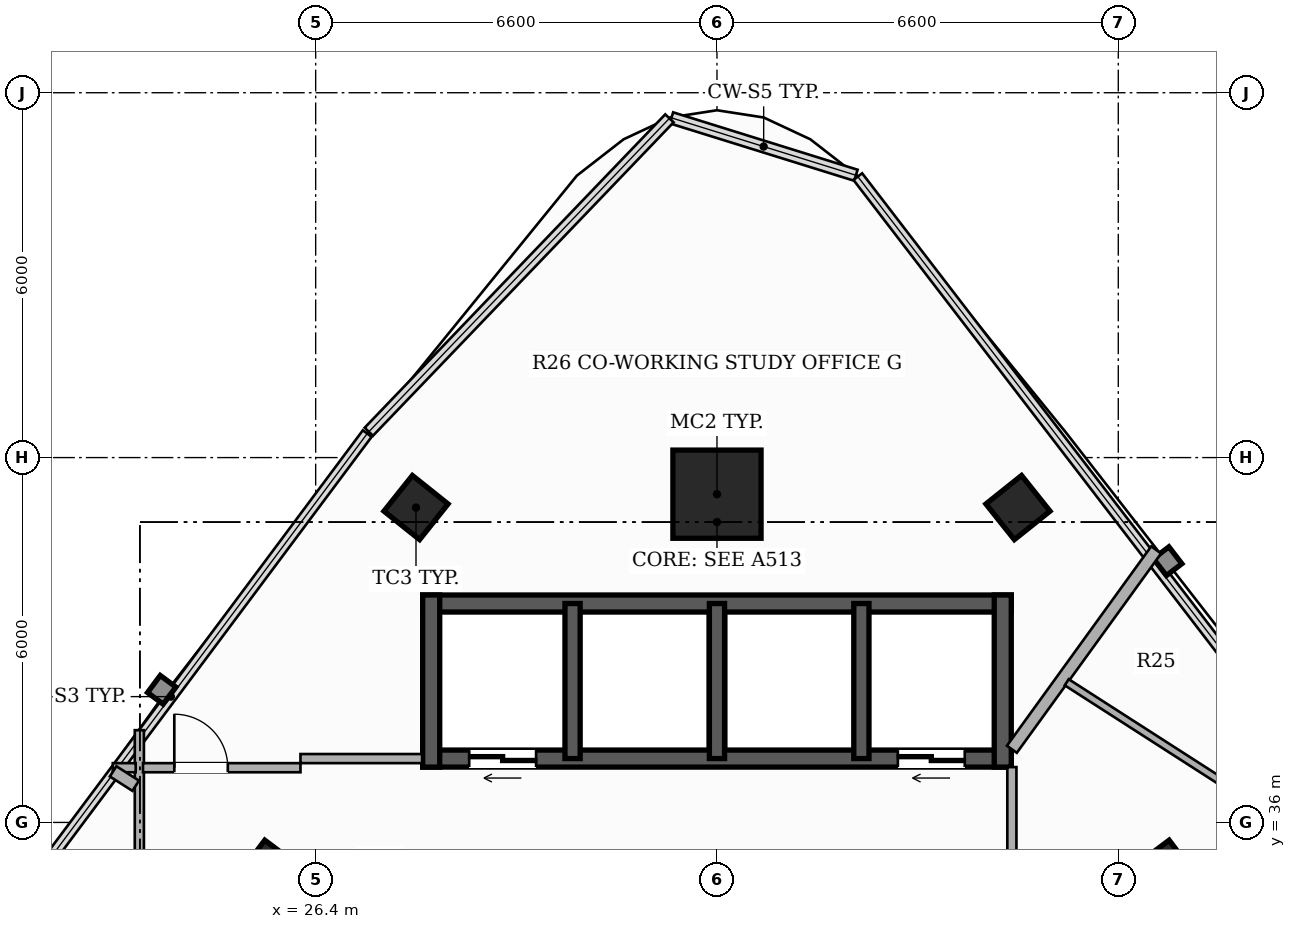
"""IFC4 building model, lengths in metres.
Left out: names, types, materials, properties, quantities, classifications, styles, units other than length and angle.
Written with IfcOpenShell. Run it as: python <this file> out.ifc"""

import sys

from ifc_helpers import new_model, si_unit, direction, frame, frame_2d, origin, origin_2d, place, context, subcontext, project, spatial, rectangle, hollow_rectangle, extrude, element, fill, save


model = new_model("IFC4")
c1 = context("Model", 3, precision=1e-05, world=origin(), true_north=direction((0.0, 1.0)))
c2 = subcontext(c1, "Body", "Model", "MODEL_VIEW")
j1 = project(units=[si_unit("LENGTHUNIT", "METRE"), si_unit("PLANEANGLEUNIT", "RADIAN")], contexts=[c1])
p1 = place(None, origin())
s1 = spatial("IfcSite", under=j1, at=p1, CompositionType="ELEMENT")
p2 = place(p1, origin())
s2 = spatial("IfcBuilding", under=s1, at=p2, CompositionType="ELEMENT")
p3 = place(p2, frame((0.0, 0.0, 177.05)))
s3 = spatial("IfcBuildingStorey", under=s2, at=p3, CompositionType="ELEMENT", Elevation=177.05)
p4 = place(p3, frame((37.84, 37.05, 0.0), z_axis=(0.0, 0.0, 1.0), x_axis=(-1.0, 0.0, 0.0)))
e1 = element("IfcWall", 1, at=p4, inside=s3, PredefinedType="SHEAR", context=c2, shape_type="SweptSolid", body=[
    extrude(rectangle(XDim=9.68, YDim=0.28, at=frame_2d((4.84, 0.0))), origin(), (0.0, 0.0, 1.0), 3.3),
])
p5 = place(p4, frame((7.815, 0.0, 0.0)))
e2 = element("IfcOpeningElement", 2, at=p5, cuts=e1, PredefinedType="OPENING", context=c2, shape_type="SweptSolid", body=[
    extrude(rectangle(XDim=1.1, YDim=2.2, at=frame_2d((0.55, 1.1))), frame((0.0, 0.15, 0.0), z_axis=(0.0, -1.0, 0.0), x_axis=(1.0, 0.0, 0.0)), (0.0, 0.0, 1.0), 0.3),
])
p6 = place(p4, frame((0.765, 0.0, 0.0)))
e3 = element("IfcOpeningElement", 3, at=p6, cuts=e1, PredefinedType="OPENING", context=c2, shape_type="SweptSolid", body=[
    extrude(rectangle(XDim=1.1, YDim=2.2, at=frame_2d((0.55, 1.1))), frame((0.0, 0.15, 0.0), z_axis=(0.0, -1.0, 0.0), x_axis=(1.0, 0.0, 0.0)), (0.0, 0.0, 1.0), 0.3),
])
p7 = place(p3, frame((28.16, 39.6, 0.0), z_axis=(0.0, 0.0, 1.0), x_axis=(1.0, 0.0, 0.0)))
e4 = element("IfcWall", 4, at=p7, inside=s3, PredefinedType="SHEAR", context=c2, shape_type="SweptSolid", body=[
    extrude(rectangle(XDim=9.68, YDim=0.28, at=frame_2d((4.84, 0.0))), origin(), (0.0, 0.0, 1.0), 3.3),
])
for number, where, z_axis, x_axis in (
    (5, (28.3, 36.91, 0.0), (0.0, 0.0, 1.0), (0.0, 1.0, 0.0)),
    (6, (37.7, 36.91, 0.0), (0.0, 0.0, 1.0), (0.0, 1.0, 0.0)),
):
    element("IfcWall", number, at=place(p3, frame(where, z_axis=z_axis, x_axis=x_axis)), inside=s3, PredefinedType="SHEAR", context=c2, shape_type="SweptSolid", body=[
        extrude(rectangle(XDim=2.83, YDim=0.28, at=frame_2d((1.415, 0.0))), origin(), (0.0, 0.0, 1.0), 3.3),
    ])
for number, where, z_axis, x_axis in (
    (7, (30.625, 37.05, 0.0), (0.0, 0.0, 1.0), (0.0, 1.0, 0.0)),
    (8, (33.0, 37.05, 0.0), (0.0, 0.0, 1.0), (0.0, 1.0, 0.0)),
    (9, (35.375, 37.05, 0.0), (0.0, 0.0, 1.0), (0.0, 1.0, 0.0)),
):
    element("IfcWall", number, at=place(p3, frame(where, z_axis=z_axis, x_axis=x_axis)), inside=s3, PredefinedType="SHEAR", context=c2, shape_type="SweptSolid", body=[
        extrude(rectangle(XDim=2.55, YDim=0.25, at=frame_2d((1.275, 0.0))), origin(), (0.0, 0.0, 1.0), 3.3),
    ])
p8 = place(p3, frame((33.0, 41.398, 0.0), z_axis=(0.0, 0.0, 1.0), x_axis=(1.0, 0.0, 0.0)))
e10 = element("IfcColumn", 10, at=p8, inside=s3, PredefinedType="COLUMN", context=c2, shape_type="SweptSolid", body=[
    extrude(hollow_rectangle(XDim=1.45, YDim=1.45, WallThickness=0.045, at=origin_2d()), origin(), (0.0, 0.0, 1.0), 3.3),
])
for number, where, z_axis, x_axis in (
    (11, (25.648, 35.113, 0.0), (0.0, 0.0, 1.0), (0.6, 0.8, 0.0)),
    (12, (40.352, 35.113, 0.0), (0.0, 0.0, 1.0), (-0.6, 0.8, 0.0)),
):
    element("IfcColumn", number, at=place(p3, frame(where, z_axis=z_axis, x_axis=x_axis)), inside=s3, PredefinedType="COLUMN", context=c2, shape_type="SweptSolid", body=[
        extrude(hollow_rectangle(XDim=0.85, YDim=0.85, WallThickness=0.028, at=origin_2d()), origin(), (0.0, 0.0, 1.0), 3.3),
    ])
for number, where, z_axis, x_axis in (
    (13, (28.05, 41.178, 0.0), (0.0, 0.0, 1.0), (0.624, 0.782, 0.0)),
    (14, (37.95, 41.178, 0.0), (0.0, 0.0, 1.0), (-0.624, 0.782, 0.0)),
):
    element("IfcColumn", number, at=place(p3, frame(where, z_axis=z_axis, x_axis=x_axis)), inside=s3, PredefinedType="COLUMN", context=c2, shape_type="SweptSolid", body=[
        extrude(hollow_rectangle(XDim=0.75, YDim=0.75, WallThickness=0.025, at=origin_2d()), origin(), (0.0, 0.0, 1.0), 3.3),
    ])
p9 = place(p3, frame((37.85, 34.65, 0.0), z_axis=(0.0, 0.0, 1.0), x_axis=(0.0, 1.0, 0.0)))
e15 = element("IfcWall", 15, at=p9, inside=s3, PredefinedType="PARTITIONING", context=c2, shape_type="SweptSolid", body=[
    extrude(rectangle(XDim=2.26, YDim=0.15, at=frame_2d((1.13, 0.0))), origin(), (0.0, 0.0, 1.0), 3.06),
])
p10 = place(p3, frame((23.5, 14.06, 0.0), z_axis=(0.0, 0.0, 1.0), x_axis=(0.0, 1.0, 0.0)))
e16 = element("IfcWall", 16, at=p10, inside=s3, PredefinedType="PARTITIONING", context=c2, shape_type="SweptSolid", body=[
    extrude(rectangle(XDim=23.457, YDim=0.15, at=frame_2d((11.729, 0.0))), origin(), (0.0, 0.0, 1.0), 2.413),
])
p11 = place(p10, frame((14.586, 0.0, 0.0)))
e17 = element("IfcOpeningElement", 17, at=p11, cuts=e16, PredefinedType="OPENING", context=c2, shape_type="SweptSolid", body=[
    extrude(rectangle(XDim=0.88, YDim=2.1, at=frame_2d((0.44, 1.05))), frame((0.0, 0.085, 0.0), z_axis=(0.0, -1.0, 0.0), x_axis=(1.0, 0.0, 0.0)), (0.0, 0.0, 1.0), 0.17),
])
p12 = place(p10, frame((3.483, 0.0, 0.0)))
e18 = element("IfcOpeningElement", 18, at=p12, cuts=e16, PredefinedType="OPENING", context=c2, shape_type="SweptSolid", body=[
    extrude(rectangle(XDim=0.92, YDim=2.15, at=frame_2d((0.46, 1.075))), frame((0.0, 0.085, 0.0), z_axis=(0.0, -1.0, 0.0), x_axis=(1.0, 0.0, 0.0)), (0.0, 0.0, 1.0), 0.17),
])
p13 = place(p3, frame((23.063, 36.9, 0.0), z_axis=(0.0, 0.0, 1.0), x_axis=(1.0, 0.0, 0.0)))
e19 = element("IfcWall", 19, at=p13, inside=s3, PredefinedType="PARTITIONING", context=c2, shape_type="SweptSolid", body=[
    extrude(rectangle(XDim=0.377, YDim=0.15, at=frame_2d((0.188, 0.0))), origin(), (0.0, 0.0, 1.0), 3.06),
])
p14 = place(p3, frame((23.56, 36.9, 0.0), z_axis=(0.0, 0.0, 1.0), x_axis=(1.0, 0.0, 0.0)))
e20 = element("IfcWall", 20, at=p14, inside=s3, PredefinedType="PARTITIONING", context=c2, shape_type="SweptSolid", body=[
    extrude(rectangle(XDim=2.59, YDim=0.15, at=frame_2d((1.295, 0.0))), origin(), (0.0, 0.0, 1.0), 2.413),
])
p15 = place(p14, frame((0.515, 0.0, 0.0)))
e21 = element("IfcOpeningElement", 21, at=p15, cuts=e20, PredefinedType="OPENING", context=c2, shape_type="SweptSolid", body=[
    extrude(rectangle(XDim=0.88, YDim=2.1, at=frame_2d((0.44, 1.05))), frame((0.0, 0.085, 0.0), z_axis=(0.0, -1.0, 0.0), x_axis=(1.0, 0.0, 0.0)), (0.0, 0.0, 1.0), 0.17),
])
p16 = place(p3, frame((26.15, 37.05, 0.0), z_axis=(0.0, 0.0, 1.0), x_axis=(1.0, 0.0, 0.0)))
e22 = element("IfcWall", 22, at=p16, inside=s3, PredefinedType="PARTITIONING", context=c2, shape_type="SweptSolid", body=[
    extrude(rectangle(XDim=2.0, YDim=0.15, at=frame_2d((1.0, 0.0))), origin(), (0.0, 0.0, 1.0), 2.413),
])
p17 = place(p3, frame((23.069, 36.84, 0.0), z_axis=(0.0, 0.0, 1.0), x_axis=(0.842563414195, -0.538597152852, 0.0)))
e23 = element("IfcWall", 23, at=p17, inside=s3, PredefinedType="PARTITIONING", context=c2, shape_type="SweptSolid", body=[
    extrude(rectangle(XDim=0.44, YDim=0.2, at=frame_2d((0.22, 0.0))), origin(), (0.0, 0.0, 1.0), 3.06),
])
p18 = place(p3, frame((37.85, 37.203, 0.0), z_axis=(0.0, 0.0, 1.0), x_axis=(0.586236886407, 0.810139687348, 0.0)))
e24 = element("IfcWall", 24, at=p18, inside=s3, PredefinedType="PARTITIONING", context=c2, shape_type="SweptSolid", body=[
    extrude(rectangle(XDim=4.048, YDim=0.2, at=frame_2d((2.024, 0.0))), origin(), (0.0, 0.0, 1.0), 2.413),
])
p19 = place(p3, frame((38.752, 38.305, 0.0), z_axis=(0.0, 0.0, 1.0), x_axis=(0.84140799898, -0.54040038791, 0.0)))
e25 = element("IfcWall", 25, at=p19, inside=s3, PredefinedType="PARTITIONING", context=c2, shape_type="SweptSolid", body=[
    extrude(rectangle(XDim=7.013, YDim=0.12, at=frame_2d((3.507, 0.0))), origin(), (0.0, 0.0, 1.0), 2.413),
])
p20 = place(p19, frame((3.816, 0.0, 0.0)))
e26 = element("IfcOpeningElement", 26, at=p20, cuts=e25, PredefinedType="OPENING", context=c2, shape_type="SweptSolid", body=[
    extrude(rectangle(XDim=0.88, YDim=2.1, at=frame_2d((0.44, 1.05))), frame((0.0, 0.07, 0.0), z_axis=(0.0, -1.0, 0.0), x_axis=(1.0, 0.0, 0.0)), (0.0, 0.0, 1.0), 0.14),
])
p21 = place(p5, origin())
e27 = element("IfcDoor", 27, at=p21, inside=s3, OperationType="DOUBLE_DOOR_SLIDING", PredefinedType="DOOR", context=c2, shape_type="SweptSolid", body=[
    extrude(rectangle(XDim=1.1, YDim=2.2, at=frame_2d((0.55, 1.1))), frame((0.0, 0.025, 0.0), z_axis=(0.0, -1.0, 0.0), x_axis=(1.0, 0.0, 0.0)), (0.0, 0.0, 1.0), 0.05),
])
fill(e2, e27)
p22 = place(p6, origin())
e28 = element("IfcDoor", 28, at=p22, inside=s3, OperationType="DOUBLE_DOOR_SLIDING", PredefinedType="DOOR", context=c2, shape_type="SweptSolid", body=[
    extrude(rectangle(XDim=1.1, YDim=2.2, at=frame_2d((0.55, 1.1))), frame((0.0, 0.025, 0.0), z_axis=(0.0, -1.0, 0.0), x_axis=(1.0, 0.0, 0.0)), (0.0, 0.0, 1.0), 0.05),
])
fill(e3, e28)
p23 = place(p15, origin())
e29 = element("IfcDoor", 29, at=p23, inside=s3, OperationType="SINGLE_SWING_LEFT", PredefinedType="DOOR", context=c2, shape_type="SweptSolid", body=[
    extrude(rectangle(XDim=0.88, YDim=2.1, at=frame_2d((0.44, 1.05))), frame((0.0, 0.025, 0.0), z_axis=(0.0, -1.0, 0.0), x_axis=(1.0, 0.0, 0.0)), (0.0, 0.0, 1.0), 0.05),
])
fill(e21, e29)
save(model, sys.argv[1])
